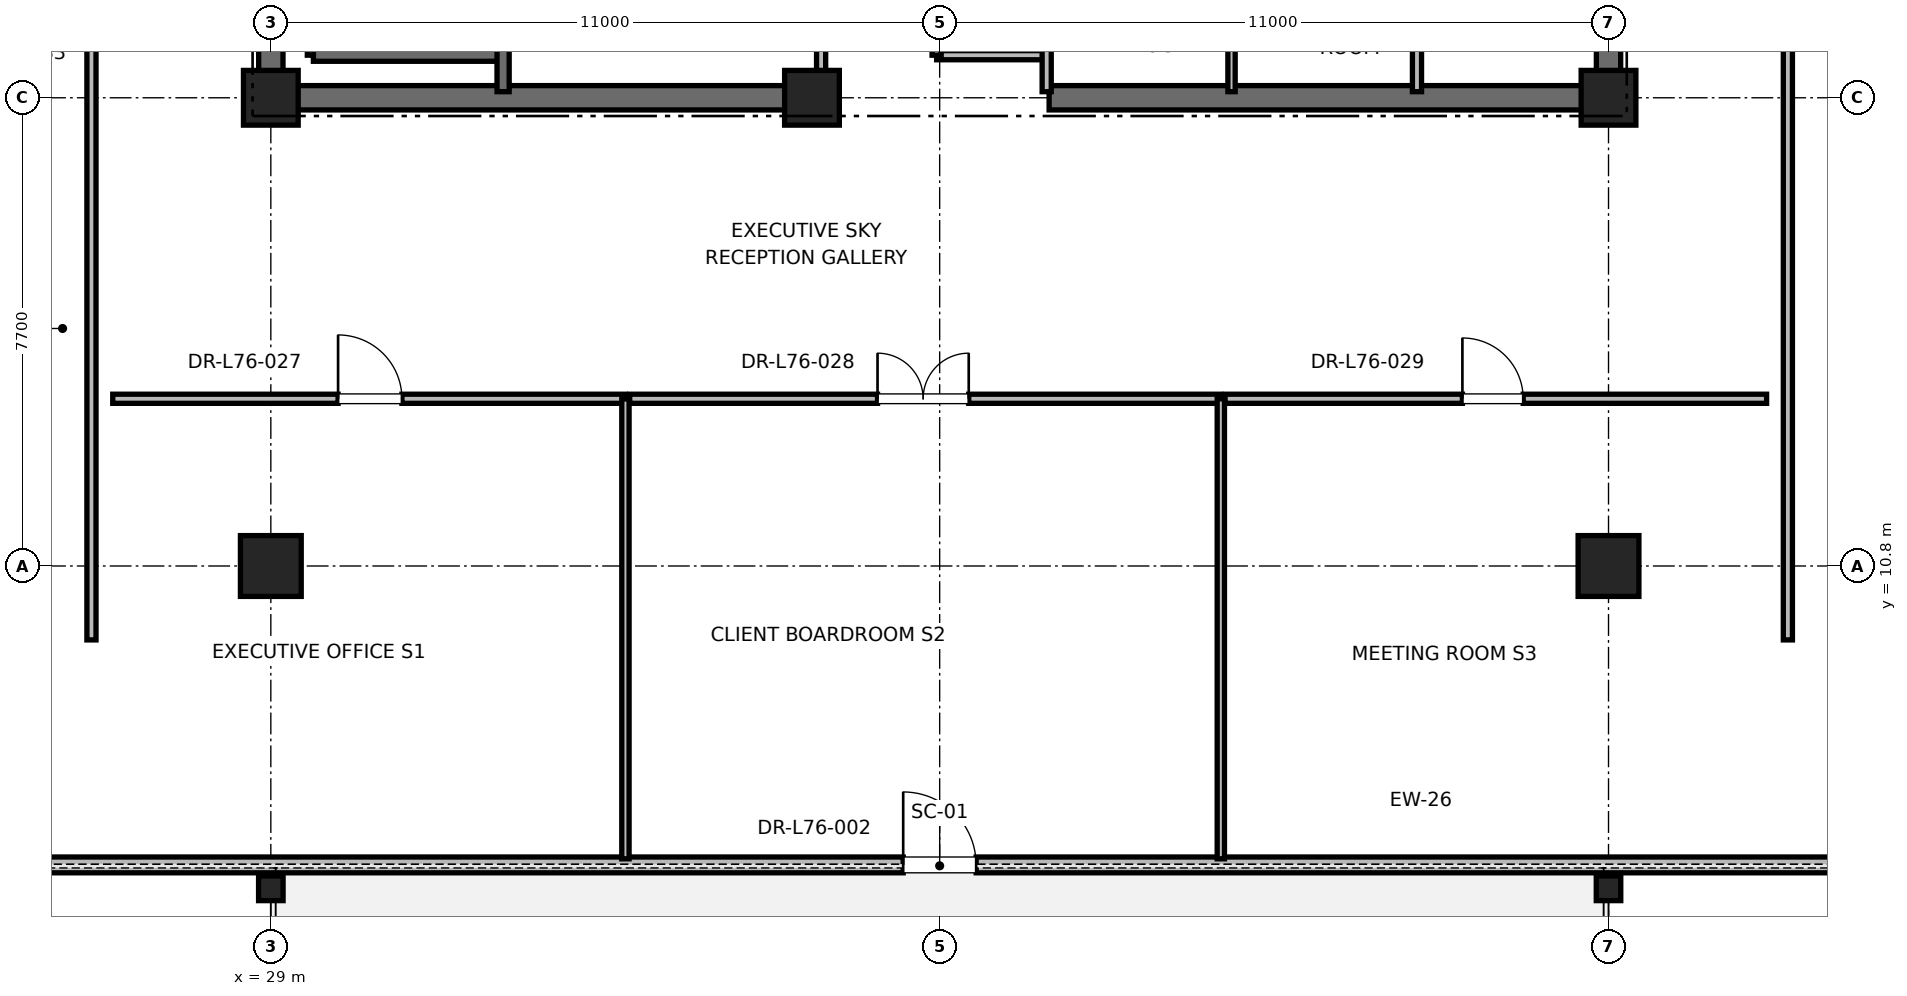
"""IFC4 building model, lengths in metres.
Left out: names, types, materials, properties, quantities, classifications, styles, units other than length and angle.
Written with IfcOpenShell. Run it as: python <this file> out.ifc"""

import sys

from ifc_helpers import new_model, si_unit, direction, frame, frame_2d, origin, origin_2d, place, context, subcontext, project, spatial, rectangle, i_section, extrude, element, fill, save


model = new_model("IFC4")
c1 = context("Model", 3, precision=1e-05, world=origin(), true_north=direction((0.0, 1.0)))
c2 = subcontext(c1, "Body", "Model", "MODEL_VIEW")
j1 = project(units=[si_unit("LENGTHUNIT", "METRE"), si_unit("PLANEANGLEUNIT", "RADIAN")], contexts=[c1])
p1 = place(None, origin())
s1 = spatial("IfcSite", under=j1, at=p1, CompositionType="ELEMENT")
p2 = place(p1, origin())
s2 = spatial("IfcBuilding", under=s1, at=p2, CompositionType="ELEMENT")
p3 = place(p2, frame((0.0, 0.0, 326.8)))
s3 = spatial("IfcBuildingStorey", under=s2, at=p3, CompositionType="ELEMENT", Elevation=326.8)
for number, where, z_axis, x_axis in (
    (1, (29.0, 10.8, 0.0), (0.0, 0.0, 1.0), (1.0, 0.0, 0.0)),
    (2, (51.0, 10.8, 0.0), (0.0, 0.0, 1.0), (1.0, 0.0, 0.0)),
):
    element("IfcColumn", number, at=place(p3, frame(where, z_axis=z_axis, x_axis=x_axis)), inside=s3, PredefinedType="COLUMN", context=c2, shape_type="SweptSolid", body=[
        extrude(rectangle(XDim=1.0, YDim=1.0, at=origin_2d()), origin(), (0.0, 0.0, 1.0), 4.0),
    ])
for number, where, z_axis, x_axis in (
    (3, (29.0, 5.5, 0.0), (0.0, 0.0, 1.0), (1.0, 0.0, 0.0)),
    (4, (51.0, 5.5, 0.0), (0.0, 0.0, 1.0), (1.0, 0.0, 0.0)),
):
    element("IfcColumn", number, at=place(p3, frame(where, z_axis=z_axis, x_axis=x_axis)), inside=s3, PredefinedType="COLUMN", context=c2, shape_type="SweptSolid", body=[
        extrude(i_section(OverallWidth=0.403, OverallDepth=0.406, WebThickness=0.027, FlangeThickness=0.043, FilletRadius=0.015, at=origin_2d()), origin(), (0.0, 0.0, 1.0), 4.0),
    ])
for number, where, z_axis, x_axis in (
    (5, (29.0, 18.5, 0.0), (0.0, 0.0, 1.0), (1.0, 0.0, 0.0)),
    (6, (51.0, 18.5, 0.0), (0.0, 0.0, 1.0), (1.0, 0.0, 0.0)),
    (7, (37.9, 18.5, 0.0), (0.0, 0.0, 1.0), (1.0, 0.0, 0.0)),
):
    element("IfcColumn", number, at=place(p3, frame(where, z_axis=z_axis, x_axis=x_axis)), inside=s3, PredefinedType="PILASTER", context=c2, shape_type="SweptSolid", body=[
        extrude(rectangle(XDim=0.9, YDim=0.9, at=origin_2d()), origin(), (0.0, 0.0, 1.0), 4.0),
    ])
for number, where, z_axis, x_axis in (
    (8, (29.0, 18.5, 0.0), (0.0, 0.0, 1.0), (1.0, 0.0, 0.0)),
    (9, (41.8, 18.5, 0.0), (0.0, 0.0, 1.0), (1.0, 0.0, 0.0)),
):
    element("IfcWall", number, at=place(p3, frame(where, z_axis=z_axis, x_axis=x_axis)), inside=s3, PredefinedType="SHEAR", context=c2, shape_type="SweptSolid", body=[
        extrude(rectangle(XDim=9.2, YDim=0.4, at=frame_2d((4.6, 0.0))), origin(), (0.0, 0.0, 1.0), 3.785),
    ])
p4 = place(p3, frame((29.0, 18.5, 0.0), z_axis=(0.0, 0.0, 1.0), x_axis=(0.0, 1.0, 0.0)))
e10 = element("IfcWall", 10, at=p4, inside=s3, PredefinedType="SHEAR", context=c2, shape_type="SweptSolid", body=[
    extrude(rectangle(XDim=8.8, YDim=0.4, at=frame_2d((4.4, 0.0))), origin(), (0.0, 0.0, 1.0), 3.785),
])
p5 = place(p3, frame((51.0, 18.5, 0.0), z_axis=(0.0, 0.0, 1.0), x_axis=(0.0, 1.0, 0.0)))
e11 = element("IfcWall", 11, at=p5, inside=s3, PredefinedType="SHEAR", context=c2, shape_type="SweptSolid", body=[
    extrude(rectangle(XDim=5.8, YDim=0.4, at=frame_2d((2.9, 0.0))), origin(), (0.0, 0.0, 1.0), 3.785),
])
p6 = place(p3, frame((18.969, 5.884, 0.0), z_axis=(0.0, 0.0, 1.0), x_axis=(1.0, 0.0, 0.0)))
e12 = element("IfcWall", 12, at=p6, inside=s3, PredefinedType="PARAPET", context=c2, shape_type="SweptSolid", body=[
    extrude(rectangle(XDim=42.063, YDim=0.26, at=frame_2d((21.031, 0.0))), origin(), (0.0, 0.0, 1.0), 3.196),
])
p7 = place(p6, frame((4.2, 0.0, 0.85)))
e13 = element("IfcOpeningElement", 13, at=p7, cuts=e12, PredefinedType="OPENING", context=c2, shape_type="SweptSolid", body=[
    extrude(rectangle(XDim=1.6, YDim=2.1, at=frame_2d((0.8, 1.05))), frame((0.0, 0.13, 0.0), z_axis=(0.0, -1.0, 0.0), x_axis=(1.0, 0.0, 0.0)), (0.0, 0.0, 1.0), 0.26),
])
p8 = place(p6, frame((20.431, 0.0, 0.0)))
e14 = element("IfcOpeningElement", 14, at=p8, cuts=e12, PredefinedType="OPENING", context=c2, shape_type="SweptSolid", body=[
    extrude(rectangle(XDim=1.2, YDim=2.2, at=frame_2d((0.6, 1.1))), frame((0.0, 0.13, 0.0), z_axis=(0.0, -1.0, 0.0), x_axis=(1.0, 0.0, 0.0)), (0.0, 0.0, 1.0), 0.26),
])
p9 = place(p6, frame((36.263, 0.0, 0.85)))
e15 = element("IfcOpeningElement", 15, at=p9, cuts=e12, PredefinedType="OPENING", context=c2, shape_type="SweptSolid", body=[
    extrude(rectangle(XDim=1.6, YDim=2.1, at=frame_2d((0.8, 1.05))), frame((0.0, 0.13, 0.0), z_axis=(0.0, -1.0, 0.0), x_axis=(1.0, 0.0, 0.0)), (0.0, 0.0, 1.0), 0.26),
])
p10 = place(p3, frame((29.7, 19.2, 0.0), z_axis=(0.0, 0.0, 1.0), x_axis=(0.0, 1.0, 0.0)))
e16 = element("IfcWall", 16, at=p10, inside=s3, PredefinedType="SOLIDWALL", context=c2, shape_type="SweptSolid", body=[
    extrude(rectangle(XDim=8.15, YDim=0.2, at=frame_2d((4.075, 0.0))), origin(), (0.0, 0.0, 1.0), 3.785),
])
p11 = place(p3, frame((29.7, 19.2, 0.0), z_axis=(0.0, 0.0, 1.0), x_axis=(1.0, 0.0, 0.0)))
e17 = element("IfcWall", 17, at=p11, inside=s3, PredefinedType="SOLIDWALL", context=c2, shape_type="SweptSolid", body=[
    extrude(rectangle(XDim=3.12, YDim=0.2, at=frame_2d((1.56, 0.0))), origin(), (0.0, 0.0, 1.0), 3.785),
])
p12 = place(p3, frame((32.82, 18.6, 0.0), z_axis=(0.0, 0.0, 1.0), x_axis=(0.0, 1.0, 0.0)))
e18 = element("IfcWall", 18, at=p12, inside=s3, PredefinedType="SOLIDWALL", context=c2, shape_type="SweptSolid", body=[
    extrude(rectangle(XDim=8.78, YDim=0.2, at=frame_2d((4.39, 0.0))), origin(), (0.0, 0.0, 1.0), 3.785),
])
p13 = place(p3, frame((39.95, 19.2, 0.0), z_axis=(0.0, 0.0, 1.0), x_axis=(1.0, 0.0, 0.0)))
e19 = element("IfcWall", 19, at=p13, inside=s3, PredefinedType="PARTITIONING", context=c2, shape_type="SweptSolid", body=[
    extrude(rectangle(XDim=1.81, YDim=0.15, at=frame_2d((0.905, 0.0))), origin(), (0.0, 0.0, 1.0), 2.85),
])
p14 = place(p3, frame((41.76, 18.6, 0.0), z_axis=(0.0, 0.0, 1.0), x_axis=(0.0, 1.0, 0.0)))
e20 = element("IfcWall", 20, at=p14, inside=s3, PredefinedType="PARTITIONING", context=c2, shape_type="SweptSolid", body=[
    extrude(rectangle(XDim=3.6, YDim=0.15, at=frame_2d((1.8, 0.0))), origin(), (0.0, 0.0, 1.0), 2.85),
])
p15 = place(p3, frame((39.95, 19.2, 0.0), z_axis=(0.0, 0.0, 1.0), x_axis=(0.0, 1.0, 0.0)))
e21 = element("IfcWall", 21, at=p15, inside=s3, PredefinedType="PARTITIONING", context=c2, shape_type="SweptSolid", body=[
    extrude(rectangle(XDim=3.0, YDim=0.15, at=frame_2d((1.5, 0.0))), origin(), (0.0, 0.0, 1.0), 2.85),
])
p16 = place(p15, frame((1.05, 0.0, 0.0)))
e22 = element("IfcOpeningElement", 22, at=p16, cuts=e21, PredefinedType="OPENING", context=c2, shape_type="SweptSolid", body=[
    extrude(rectangle(XDim=0.9, YDim=2.1, at=frame_2d((0.45, 1.05))), frame((0.0, 0.075, 0.0), z_axis=(0.0, -1.0, 0.0), x_axis=(1.0, 0.0, 0.0)), (0.0, 0.0, 1.0), 0.15),
])
p17 = place(p3, frame((38.05, 18.6, 0.0), z_axis=(0.0, 0.0, 1.0), x_axis=(0.0, 1.0, 0.0)))
e23 = element("IfcWall", 23, at=p17, inside=s3, PredefinedType="PARTITIONING", context=c2, shape_type="SweptSolid", body=[
    extrude(rectangle(XDim=4.46, YDim=0.15, at=frame_2d((2.23, 0.0))), origin(), (0.0, 0.0, 1.0), 2.85),
])
p18 = place(p17, frame((1.73, 0.0, 0.0)))
e24 = element("IfcOpeningElement", 24, at=p18, cuts=e23, PredefinedType="OPENING", context=c2, shape_type="SweptSolid", body=[
    extrude(rectangle(XDim=1.0, YDim=2.15, at=frame_2d((0.5, 1.075))), frame((0.0, 0.075, 0.0), z_axis=(0.0, -1.0, 0.0), x_axis=(1.0, 0.0, 0.0)), (0.0, 0.0, 1.0), 0.15),
])
p19 = place(p3, frame((47.85, 18.6, 0.0), z_axis=(0.0, 0.0, 1.0), x_axis=(0.0, 1.0, 0.0)))
e25 = element("IfcWall", 25, at=p19, inside=s3, PredefinedType="PARTITIONING", context=c2, shape_type="SweptSolid", body=[
    extrude(rectangle(XDim=2.54, YDim=0.15, at=frame_2d((1.27, 0.0))), origin(), (0.0, 0.0, 1.0), 2.85),
])
p20 = place(p3, frame((44.8, 18.6, 0.0), z_axis=(0.0, 0.0, 1.0), x_axis=(0.0, 1.0, 0.0)))
e26 = element("IfcWall", 26, at=p20, inside=s3, PredefinedType="PARTITIONING", context=c2, shape_type="SweptSolid", body=[
    extrude(rectangle(XDim=3.02, YDim=0.12, at=frame_2d((1.51, 0.0))), origin(), (0.0, 0.0, 1.0), 2.85),
])
p21 = place(p3, frame((26.4, 13.55, 0.0), z_axis=(0.0, 0.0, 1.0), x_axis=(1.0, 0.0, 0.0)))
e27 = element("IfcWall", 27, at=p21, inside=s3, PredefinedType="PARTITIONING", context=c2, shape_type="SweptSolid", body=[
    extrude(rectangle(XDim=8.432, YDim=0.15, at=frame_2d((4.216, 0.0))), origin(), (0.0, 0.0, 1.0), 2.85),
])
p22 = place(p21, frame((3.706, 0.0, 0.0)))
e28 = element("IfcOpeningElement", 28, at=p22, cuts=e27, PredefinedType="OPENING", context=c2, shape_type="SweptSolid", body=[
    extrude(rectangle(XDim=1.05, YDim=2.2, at=frame_2d((0.525, 1.1))), frame((0.0, 0.075, 0.0), z_axis=(0.0, -1.0, 0.0), x_axis=(1.0, 0.0, 0.0)), (0.0, 0.0, 1.0), 0.15),
])
p23 = place(p3, frame((34.832, 5.984, 0.0), z_axis=(0.0, 0.0, 1.0), x_axis=(0.0, 1.0, 0.0)))
e29 = element("IfcWall", 29, at=p23, inside=s3, PredefinedType="PARTITIONING", context=c2, shape_type="SweptSolid", body=[
    extrude(rectangle(XDim=7.566, YDim=0.12, at=frame_2d((3.783, 0.0))), origin(), (0.0, 0.0, 1.0), 2.415),
])
p24 = place(p3, frame((34.902, 13.55, 0.0), z_axis=(0.0, 0.0, 1.0), x_axis=(1.0, 0.0, 0.0)))
e30 = element("IfcWall", 30, at=p24, inside=s3, PredefinedType="PARTITIONING", context=c2, shape_type="SweptSolid", body=[
    extrude(rectangle(XDim=9.722, YDim=0.15, at=frame_2d((4.861, 0.0))), origin(), (0.0, 0.0, 1.0), 2.85),
])
p25 = place(p24, frame((4.076, 0.0, 0.0)))
e31 = element("IfcOpeningElement", 31, at=p25, cuts=e30, PredefinedType="OPENING", context=c2, shape_type="SweptSolid", body=[
    extrude(rectangle(XDim=1.5, YDim=2.25, at=frame_2d((0.75, 1.125))), frame((0.0, 0.075, 0.0), z_axis=(0.0, -1.0, 0.0), x_axis=(1.0, 0.0, 0.0)), (0.0, 0.0, 1.0), 0.15),
])
p26 = place(p3, frame((44.624, 5.984, 0.0), z_axis=(0.0, 0.0, 1.0), x_axis=(0.0, 1.0, 0.0)))
e32 = element("IfcWall", 32, at=p26, inside=s3, PredefinedType="PARTITIONING", context=c2, shape_type="SweptSolid", body=[
    extrude(rectangle(XDim=7.566, YDim=0.12, at=frame_2d((3.783, 0.0))), origin(), (0.0, 0.0, 1.0), 2.415),
])
p27 = place(p3, frame((44.694, 13.55, 0.0), z_axis=(0.0, 0.0, 1.0), x_axis=(1.0, 0.0, 0.0)))
e33 = element("IfcWall", 33, at=p27, inside=s3, PredefinedType="PARTITIONING", context=c2, shape_type="SweptSolid", body=[
    extrude(rectangle(XDim=8.906, YDim=0.15, at=frame_2d((4.453, 0.0))), origin(), (0.0, 0.0, 1.0), 2.85),
])
p28 = place(p27, frame((3.903, 0.0, 0.0)))
e34 = element("IfcOpeningElement", 34, at=p28, cuts=e33, PredefinedType="OPENING", context=c2, shape_type="SweptSolid", body=[
    extrude(rectangle(XDim=1.0, YDim=2.15, at=frame_2d((0.5, 1.075))), frame((0.0, 0.075, 0.0), z_axis=(0.0, -1.0, 0.0), x_axis=(1.0, 0.0, 0.0)), (0.0, 0.0, 1.0), 0.15),
])
p29 = place(p3, frame((26.05, 9.584, 0.0), z_axis=(0.0, 0.0, 1.0), x_axis=(0.0, 1.0, 0.0)))
e35 = element("IfcWall", 35, at=p29, inside=s3, PredefinedType="PARTITIONING", context=c2, shape_type="SweptSolid", body=[
    extrude(rectangle(XDim=12.541, YDim=0.15, at=frame_2d((6.271, 0.0))), origin(), (0.0, 0.0, 1.0), 2.85),
])
p30 = place(p29, frame((10.243, 0.0, 0.0)))
e36 = element("IfcOpeningElement", 36, at=p30, cuts=e35, PredefinedType="OPENING", context=c2, shape_type="SweptSolid", body=[
    extrude(rectangle(XDim=1.0, YDim=2.15, at=frame_2d((0.5, 1.075))), frame((0.0, 0.075, 0.0), z_axis=(0.0, -1.0, 0.0), x_axis=(1.0, 0.0, 0.0)), (0.0, 0.0, 1.0), 0.15),
])
p31 = place(p3, frame((53.95, 9.584, 0.0), z_axis=(0.0, 0.0, 1.0), x_axis=(0.0, 1.0, 0.0)))
e37 = element("IfcWall", 37, at=p31, inside=s3, PredefinedType="PARTITIONING", context=c2, shape_type="SweptSolid", body=[
    extrude(rectangle(XDim=15.049, YDim=0.15, at=frame_2d((7.525, 0.0))), origin(), (0.0, 0.0, 1.0), 2.85),
])
p32 = place(p31, frame((11.497, 0.0, 0.0)))
e38 = element("IfcOpeningElement", 38, at=p32, cuts=e37, PredefinedType="OPENING", context=c2, shape_type="SweptSolid", body=[
    extrude(rectangle(XDim=1.0, YDim=2.15, at=frame_2d((0.5, 1.075))), frame((0.0, 0.075, 0.0), z_axis=(0.0, -1.0, 0.0), x_axis=(1.0, 0.0, 0.0)), (0.0, 0.0, 1.0), 0.15),
])
p33 = place(p8, origin())
e39 = element("IfcDoor", 39, at=p33, inside=s3, OperationType="SINGLE_SWING_LEFT", PredefinedType="DOOR", context=c2, shape_type="SweptSolid", body=[
    extrude(rectangle(XDim=1.2, YDim=2.2, at=frame_2d((0.6, 1.1))), frame((0.0, 0.025, 0.0), z_axis=(0.0, -1.0, 0.0), x_axis=(1.0, 0.0, 0.0)), (0.0, 0.0, 1.0), 0.05),
])
fill(e14, e39)
p34 = place(p22, origin())
e40 = element("IfcDoor", 40, at=p34, inside=s3, OperationType="SINGLE_SWING_LEFT", PredefinedType="DOOR", context=c2, shape_type="SweptSolid", body=[
    extrude(rectangle(XDim=1.05, YDim=2.2, at=frame_2d((0.525, 1.1))), frame((0.0, 0.025, 0.0), z_axis=(0.0, -1.0, 0.0), x_axis=(1.0, 0.0, 0.0)), (0.0, 0.0, 1.0), 0.05),
])
fill(e28, e40)
p35 = place(p25, origin())
e41 = element("IfcDoor", 41, at=p35, inside=s3, OperationType="DOUBLE_DOOR_SINGLE_SWING", PredefinedType="DOOR", context=c2, shape_type="SweptSolid", body=[
    extrude(rectangle(XDim=1.5, YDim=2.25, at=frame_2d((0.75, 1.125))), frame((0.0, 0.025, 0.0), z_axis=(0.0, -1.0, 0.0), x_axis=(1.0, 0.0, 0.0)), (0.0, 0.0, 1.0), 0.05),
])
fill(e31, e41)
p36 = place(p28, origin())
e42 = element("IfcDoor", 42, at=p36, inside=s3, OperationType="SINGLE_SWING_LEFT", PredefinedType="DOOR", context=c2, shape_type="SweptSolid", body=[
    extrude(rectangle(XDim=1.0, YDim=2.15, at=frame_2d((0.5, 1.075))), frame((0.0, 0.025, 0.0), z_axis=(0.0, -1.0, 0.0), x_axis=(1.0, 0.0, 0.0)), (0.0, 0.0, 1.0), 0.05),
])
fill(e34, e42)
save(model, sys.argv[1])
